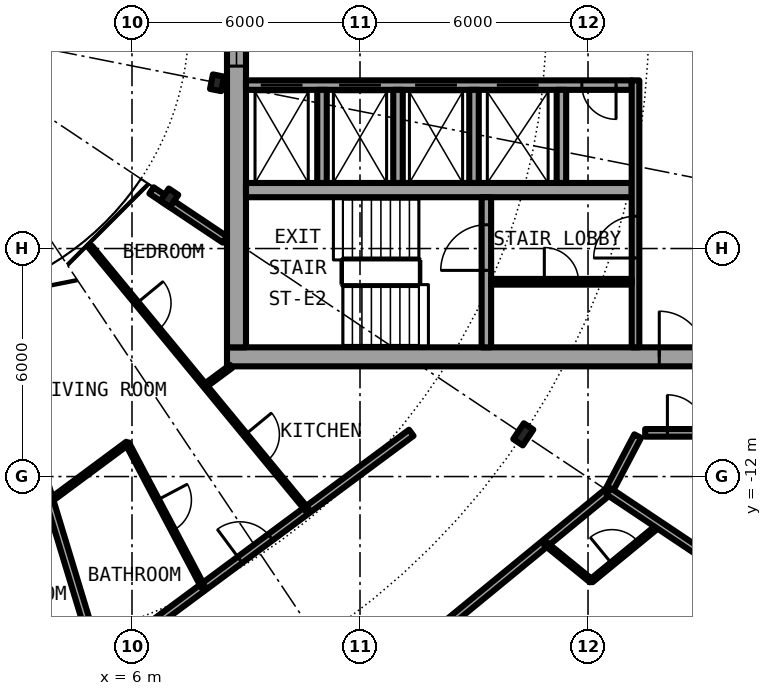
"""IFC4 building model, lengths in metres.
Left out: names, types, materials, properties, quantities, classifications, styles, units other than length and angle.
Written with IfcOpenShell. Run it as: python <this file> out.ifc"""

import sys

from ifc_helpers import new_model, si_unit, direction, frame, frame_2d, origin, origin_2d, place, context, subcontext, project, spatial, rectangle, i_section, extrude, element, fill, save


model = new_model("IFC4")
c1 = context("Model", 3, precision=1e-05, world=origin(), true_north=direction((0.0, 1.0)))
c2 = subcontext(c1, "Body", "Model", "MODEL_VIEW")
j1 = project(units=[si_unit("LENGTHUNIT", "METRE"), si_unit("PLANEANGLEUNIT", "RADIAN")], contexts=[c1])
p1 = place(None, origin())
s1 = spatial("IfcSite", under=j1, at=p1, CompositionType="ELEMENT")
p2 = place(p1, origin())
s2 = spatial("IfcBuilding", under=s1, at=p2, CompositionType="ELEMENT")
p3 = place(p2, frame((0.0, 0.0, 154.35)))
s3 = spatial("IfcBuildingStorey", under=s2, at=p3, CompositionType="ELEMENT", Elevation=154.35)
p4 = place(p3, frame((16.297, -10.889, 0.0), z_axis=(0.0, 0.0, 1.0), x_axis=(0.831469612303, -0.55557023302, 0.0)))
e1 = element("IfcColumn", 1, at=p4, inside=s3, PredefinedType="COLUMN", context=c2, shape_type="SweptSolid", body=[
    extrude(i_section(OverallWidth=0.3, OverallDepth=0.5, WebThickness=0.014, FlangeThickness=0.028, FilletRadius=0.027, at=origin_2d()), origin(), (0.0, 0.0, 1.0), 3.05),
])
for number, where, z_axis, x_axis in (
    (2, (6.984, -4.667, 0.0), (0.0, 0.0, 1.0), (0.831, -0.556, 0.0)),
    (3, (8.239, -1.639, 0.0), (0.0, 0.0, 1.0), (0.981, -0.195, 0.0)),
):
    element("IfcColumn", number, at=place(p3, frame(where, z_axis=z_axis, x_axis=x_axis)), inside=s3, PredefinedType="COLUMN", context=c2, shape_type="SweptSolid", body=[
        extrude(i_section(OverallWidth=0.3, OverallDepth=0.39, WebThickness=0.011, FlangeThickness=0.019, FilletRadius=0.027, at=origin_2d()), origin(), (0.0, 0.0, 1.0), 3.05),
    ])
p5 = place(p3, frame((19.304, -19.304, 0.0), z_axis=(0.0, 0.0, 1.0), x_axis=(0.634382322723, 0.773019449054, 0.0)))
e4 = element("IfcWall", 4, at=p5, inside=s3, PredefinedType="SOLIDWALL", context=c2, shape_type="SweptSolid", body=[
    extrude(rectangle(XDim=5.352, YDim=0.25, at=frame_2d((2.676, 0.0))), origin(), (0.0, 0.0, 1.0), 2.7),
])
p6 = place(p5, frame((0.841, 0.0, 0.0)))
e5 = element("IfcOpeningElement", 5, at=p6, cuts=e4, PredefinedType="OPENING", context=c2, shape_type="SweptSolid", body=[
    extrude(rectangle(XDim=1.0, YDim=2.2, at=frame_2d((0.5, 1.1))), frame((0.0, 0.135, 0.0), z_axis=(0.0, -1.0, 0.0), x_axis=(1.0, 0.0, 0.0)), (0.0, 0.0, 1.0), 0.27),
])
p7 = place(p5, frame((3.111, 0.0, 0.3)))
e6 = element("IfcOpeningElement", 6, at=p7, cuts=e4, PredefinedType="OPENING", context=c2, shape_type="SweptSolid", body=[
    extrude(rectangle(XDim=1.8, YDim=2.1, at=frame_2d((0.9, 1.05))), frame((0.0, 0.135, 0.0), z_axis=(0.0, -1.0, 0.0), x_axis=(1.0, 0.0, 0.0)), (0.0, 0.0, 1.0), 0.27),
])
p8 = place(p3, frame((8.5, -8.85, 0.0), z_axis=(0.0, 0.0, 1.0), x_axis=(1.0, 0.0, 0.0)))
e7 = element("IfcWall", 7, at=p8, inside=s3, PredefinedType="SHEAR", context=c2, shape_type="SweptSolid", body=[
    extrude(rectangle(XDim=13.6, YDim=0.5, at=frame_2d((6.8, 0.0))), origin(), (0.0, 0.0, 1.0), 3.05),
])
p9 = place(p8, frame((11.375, 0.0, 0.0)))
e8 = element("IfcOpeningElement", 8, at=p9, cuts=e7, PredefinedType="OPENING", context=c2, shape_type="SweptSolid", body=[
    extrude(rectangle(XDim=1.2, YDim=2.3, at=frame_2d((0.6, 1.15))), frame((0.0, 0.26, 0.0), z_axis=(0.0, -1.0, 0.0), x_axis=(1.0, 0.0, 0.0)), (0.0, 0.0, 1.0), 0.52),
])
p10 = place(p3, frame((8.75, -8.6, 0.0), z_axis=(0.0, 0.0, 1.0), x_axis=(0.0, 1.0, 0.0)))
e9 = element("IfcWall", 9, at=p10, inside=s3, PredefinedType="SHEAR", context=c2, shape_type="SweptSolid", body=[
    extrude(rectangle(XDim=17.2, YDim=0.5, at=frame_2d((8.6, 0.0))), origin(), (0.0, 0.0, 1.0), 3.05),
])
p11 = place(p10, frame((7.4, 0.0, 0.1)))
e10 = element("IfcOpeningElement", 10, at=p11, cuts=e9, PredefinedType="OPENING", context=c2, shape_type="SweptSolid", body=[
    extrude(rectangle(XDim=2.4, YDim=2.2, at=frame_2d((1.2, 1.1))), frame((0.0, 0.26, 0.0), z_axis=(0.0, -1.0, 0.0), x_axis=(1.0, 0.0, 0.0)), (0.0, 0.0, 1.0), 0.52),
])
p12 = place(p3, frame((19.15, -1.7, 0.0), z_axis=(0.0, 0.0, 1.0), x_axis=(-1.0, 0.0, 0.0)))
e11 = element("IfcWall", 11, at=p12, inside=s3, PredefinedType="SHEAR", context=c2, shape_type="SweptSolid", body=[
    extrude(rectangle(XDim=10.15, YDim=0.25, at=frame_2d((5.075, 0.0))), origin(), (0.0, 0.0, 1.0), 3.05),
])
p13 = place(p12, frame((8.663, 0.0, 0.0)))
e12 = element("IfcOpeningElement", 12, at=p13, cuts=e11, PredefinedType="OPENING", context=c2, shape_type="SweptSolid", body=[
    extrude(rectangle(XDim=1.1, YDim=2.3, at=frame_2d((0.55, 1.15))), frame((0.0, 0.135, 0.0), z_axis=(0.0, -1.0, 0.0), x_axis=(1.0, 0.0, 0.0)), (0.0, 0.0, 1.0), 0.27),
])
p14 = place(p12, frame((6.6, 0.0, 0.0)))
e13 = element("IfcOpeningElement", 13, at=p14, cuts=e11, PredefinedType="OPENING", context=c2, shape_type="SweptSolid", body=[
    extrude(rectangle(XDim=1.1, YDim=2.3, at=frame_2d((0.55, 1.15))), frame((0.0, 0.135, 0.0), z_axis=(0.0, -1.0, 0.0), x_axis=(1.0, 0.0, 0.0)), (0.0, 0.0, 1.0), 0.27),
])
p15 = place(p12, frame((4.6, 0.0, 0.0)))
e14 = element("IfcOpeningElement", 14, at=p15, cuts=e11, PredefinedType="OPENING", context=c2, shape_type="SweptSolid", body=[
    extrude(rectangle(XDim=1.1, YDim=2.3, at=frame_2d((0.55, 1.15))), frame((0.0, 0.135, 0.0), z_axis=(0.0, -1.0, 0.0), x_axis=(1.0, 0.0, 0.0)), (0.0, 0.0, 1.0), 0.27),
])
p16 = place(p12, frame((2.45, 0.0, 0.0)))
e15 = element("IfcOpeningElement", 15, at=p16, cuts=e11, PredefinedType="OPENING", context=c2, shape_type="SweptSolid", body=[
    extrude(rectangle(XDim=1.1, YDim=2.3, at=frame_2d((0.55, 1.15))), frame((0.0, 0.135, 0.0), z_axis=(0.0, -1.0, 0.0), x_axis=(1.0, 0.0, 0.0)), (0.0, 0.0, 1.0), 0.27),
])
p17 = place(p12, frame((0.413, 0.0, 0.0)))
e16 = element("IfcOpeningElement", 16, at=p17, cuts=e11, PredefinedType="OPENING", context=c2, shape_type="SweptSolid", body=[
    extrude(rectangle(XDim=0.9, YDim=2.3, at=frame_2d((0.45, 1.15))), frame((0.0, 0.135, 0.0), z_axis=(0.0, -1.0, 0.0), x_axis=(1.0, 0.0, 0.0)), (0.0, 0.0, 1.0), 0.27),
])
p18 = place(p3, frame((9.0, -4.462, 0.0), z_axis=(0.0, 0.0, 1.0), x_axis=(1.0, 0.0, 0.0)))
e17 = element("IfcWall", 17, at=p18, inside=s3, PredefinedType="SHEAR", context=c2, shape_type="SweptSolid", body=[
    extrude(rectangle(XDim=10.15, YDim=0.375, at=frame_2d((5.075, 0.0))), origin(), (0.0, 0.0, 1.0), 3.05),
])
p19 = place(p3, frame((15.325, -8.6, 0.0), z_axis=(0.0, 0.0, 1.0), x_axis=(0.0, 1.0, 0.0)))
e18 = element("IfcWall", 18, at=p19, inside=s3, PredefinedType="SHEAR", context=c2, shape_type="SweptSolid", body=[
    extrude(rectangle(XDim=3.95, YDim=0.25, at=frame_2d((1.975, 0.0))), origin(), (0.0, 0.0, 1.0), 3.05),
])
p20 = place(p19, frame((2.025, 0.0, 0.0)))
e19 = element("IfcOpeningElement", 19, at=p20, cuts=e18, PredefinedType="OPENING", context=c2, shape_type="SweptSolid", body=[
    extrude(rectangle(XDim=1.2, YDim=2.3, at=frame_2d((0.6, 1.15))), frame((0.0, 0.135, 0.0), z_axis=(0.0, -1.0, 0.0), x_axis=(1.0, 0.0, 0.0)), (0.0, 0.0, 1.0), 0.27),
])
for number, where, z_axis, x_axis in (
    (20, (15.0, -1.825, 0.0), (0.0, 0.0, 1.0), (0.0, -1.0, 0.0)),
    (21, (17.3, -1.825, 0.0), (0.0, 0.0, 1.0), (0.0, -1.0, 0.0)),
):
    element("IfcWall", number, at=place(p3, frame(where, z_axis=z_axis, x_axis=x_axis)), inside=s3, PredefinedType="SOLIDWALL", context=c2, shape_type="SweptSolid", body=[
        extrude(rectangle(XDim=2.45, YDim=0.25, at=frame_2d((1.225, 0.0))), origin(), (0.0, 0.0, 1.0), 2.7),
    ])
p21 = place(p3, frame((19.25, -8.6, 0.0), z_axis=(0.0, 0.0, 1.0), x_axis=(0.0, 1.0, 0.0)))
e22 = element("IfcWall", 22, at=p21, inside=s3, PredefinedType="SOLIDWALL", context=c2, shape_type="SweptSolid", body=[
    extrude(rectangle(XDim=7.025, YDim=0.2, at=frame_2d((3.513, 0.0))), origin(), (0.0, 0.0, 1.0), 2.7),
])
p22 = place(p21, frame((2.35, 0.0, 0.0)))
e23 = element("IfcOpeningElement", 23, at=p22, cuts=e22, PredefinedType="OPENING", context=c2, shape_type="SweptSolid", body=[
    extrude(rectangle(XDim=1.1, YDim=2.3, at=frame_2d((0.55, 1.15))), frame((0.0, 0.11, 0.0), z_axis=(0.0, -1.0, 0.0), x_axis=(1.0, 0.0, 0.0)), (0.0, 0.0, 1.0), 0.22),
])
for number, where, z_axis, x_axis in (
    (24, (11.0, -1.825, 0.0), (0.0, 0.0, 1.0), (0.0, -1.0, 0.0)),
    (25, (13.0, -1.825, 0.0), (0.0, 0.0, 1.0), (0.0, -1.0, 0.0)),
):
    element("IfcWall", number, at=place(p3, frame(where, z_axis=z_axis, x_axis=x_axis)), inside=s3, PredefinedType="SOLIDWALL", context=c2, shape_type="SweptSolid", body=[
        extrude(rectangle(XDim=2.45, YDim=0.25, at=frame_2d((1.225, 0.0))), origin(), (0.0, 0.0, 1.0), 2.7),
    ])
p23 = place(p3, frame((15.45, -6.875, 0.0), z_axis=(0.0, 0.0, 1.0), x_axis=(1.0, 0.0, 0.0)))
e26 = element("IfcWall", 26, at=p23, inside=s3, PredefinedType="PARTITIONING", context=c2, shape_type="SweptSolid", body=[
    extrude(rectangle(XDim=3.7, YDim=0.15, at=frame_2d((1.85, 0.0))), origin(), (0.0, 0.0, 1.0), 2.7),
])
p24 = place(p23, frame((1.4, 0.0, 0.0)))
e27 = element("IfcOpeningElement", 27, at=p24, cuts=e26, PredefinedType="OPENING", context=c2, shape_type="SweptSolid", body=[
    extrude(rectangle(XDim=0.9, YDim=2.3, at=frame_2d((0.45, 1.15))), frame((0.0, 0.085, 0.0), z_axis=(0.0, -1.0, 0.0), x_axis=(1.0, 0.0, 0.0)), (0.0, 0.0, 1.0), 0.17),
])
p25 = place(p3, frame((18.087, -14.742, 0.0), z_axis=(0.0, 0.0, 1.0), x_axis=(0.77288890179, 0.634541366256, 0.0)))
e28 = element("IfcWall", 28, at=p25, inside=s3, PredefinedType="PARTITIONING", context=c2, shape_type="SweptSolid", body=[
    extrude(rectangle(XDim=2.313, YDim=0.1, at=frame_2d((1.157, 0.0))), origin(), (0.0, 0.0, 1.0), 2.7),
])
p26 = place(p25, frame((0.702, 0.0, 0.0)))
e29 = element("IfcOpeningElement", 29, at=p26, cuts=e28, PredefinedType="OPENING", context=c2, shape_type="SweptSolid", body=[
    extrude(rectangle(XDim=0.9, YDim=2.3, at=frame_2d((0.45, 1.15))), frame((0.0, 0.06, 0.0), z_axis=(0.0, -1.0, 0.0), x_axis=(1.0, 0.0, 0.0)), (0.0, 0.0, 1.0), 0.12),
])
p27 = place(p3, frame((18.542, -12.389, 0.0), z_axis=(0.0, 0.0, 1.0), x_axis=(0.465605550524, 0.884992356646, 0.0)))
e30 = element("IfcWall", 30, at=p27, inside=s3, PredefinedType="PARTITIONING", context=c2, shape_type="SweptSolid", body=[
    extrude(rectangle(XDim=1.643, YDim=0.2, at=frame_2d((0.821, 0.0))), origin(), (0.0, 0.0, 1.0), 2.7),
])
p28 = place(p3, frame((8.534, -20.603, 0.0), z_axis=(0.0, 0.0, 1.0), x_axis=(0.772983503654, 0.634426121056, 0.0)))
e31 = element("IfcWall", 31, at=p28, inside=s3, PredefinedType="PARTITIONING", context=c2, shape_type="SweptSolid", body=[
    extrude(rectangle(XDim=12.947, YDim=0.2, at=frame_2d((6.474, 0.0))), origin(), (0.0, 0.0, 1.0), 2.7),
])
p29 = place(p28, frame((4.895, 0.0, 0.0)))
e32 = element("IfcOpeningElement", 32, at=p29, cuts=e31, PredefinedType="OPENING", context=c2, shape_type="SweptSolid", body=[
    extrude(rectangle(XDim=1.0, YDim=2.3, at=frame_2d((0.5, 1.15))), frame((0.0, 0.11, 0.0), z_axis=(0.0, -1.0, 0.0), x_axis=(1.0, 0.0, 0.0)), (0.0, 0.0, 1.0), 0.22),
])
p30 = place(p3, frame((5.137, -16.938, 0.0), z_axis=(0.0, 0.0, 1.0), x_axis=(0.803229232922, 0.595670042371, 0.0)))
e33 = element("IfcWall", 33, at=p30, inside=s3, PredefinedType="PARTITIONING", context=c2, shape_type="SweptSolid", body=[
    extrude(rectangle(XDim=10.224, YDim=0.2, at=frame_2d((5.112, 0.0))), origin(), (0.0, 0.0, 1.0), 2.7),
])
p31 = place(p30, frame((4.612, 0.0, 0.0)))
e34 = element("IfcOpeningElement", 34, at=p31, cuts=e33, PredefinedType="OPENING", context=c2, shape_type="SweptSolid", body=[
    extrude(rectangle(XDim=1.0, YDim=2.3, at=frame_2d((0.5, 1.15))), frame((0.0, 0.11, 0.0), z_axis=(0.0, -1.0, 0.0), x_axis=(1.0, 0.0, 0.0)), (0.0, 0.0, 1.0), 0.22),
])
p32 = place(p3, frame((3.835, -12.64, 0.0), z_axis=(0.0, 0.0, 1.0), x_axis=(0.803259509791, 0.595629213463, 0.0)))
e35 = element("IfcWall", 35, at=p32, inside=s3, PredefinedType="PARTITIONING", context=c2, shape_type="SweptSolid", body=[
    extrude(rectangle(XDim=2.543, YDim=0.1, at=frame_2d((1.272, 0.0))), origin(), (0.0, 0.0, 1.0), 2.7),
])
p33 = place(p3, frame((7.919, -9.611, 0.0), z_axis=(0.0, 0.0, 1.0), x_axis=(0.803199066515, 0.595710718007, 0.0)))
e36 = element("IfcWall", 36, at=p33, inside=s3, PredefinedType="PARTITIONING", context=c2, shape_type="SweptSolid", body=[
    extrude(rectangle(XDim=0.858, YDim=0.1, at=frame_2d((0.429, 0.0))), origin(), (0.0, 0.0, 1.0), 2.7),
])
p34 = place(p3, frame((19.504, -10.85, 0.0), z_axis=(0.0, 0.0, 1.0), x_axis=(1.0, 0.0, 0.0)))
e37 = element("IfcWall", 37, at=p34, inside=s3, PredefinedType="PARTITIONING", context=c2, shape_type="SweptSolid", body=[
    extrude(rectangle(XDim=2.171, YDim=0.2, at=frame_2d((1.085, 0.0))), origin(), (0.0, 0.0, 1.0), 2.7),
])
p35 = place(p34, frame((0.585, 0.0, 0.0)))
e38 = element("IfcOpeningElement", 38, at=p35, cuts=e37, PredefinedType="OPENING", context=c2, shape_type="SweptSolid", body=[
    extrude(rectangle(XDim=1.0, YDim=2.3, at=frame_2d((0.5, 1.15))), frame((0.0, 0.11, 0.0), z_axis=(0.0, -1.0, 0.0), x_axis=(1.0, 0.0, 0.0)), (0.0, 0.0, 1.0), 0.22),
])
p36 = place(p3, frame((6.513, -4.472, 0.0), z_axis=(0.0, 0.0, 1.0), x_axis=(0.83133816625, -0.555766905579, 0.0)))
e39 = element("IfcWall", 39, at=p36, inside=s3, PredefinedType="PARTITIONING", context=c2, shape_type="SweptSolid", body=[
    extrude(rectangle(XDim=2.323, YDim=0.2, at=frame_2d((1.162, 0.0))), origin(), (0.0, 0.0, 1.0), 2.7),
])
p37 = place(p3, frame((2.241, -7.388, 0.0), z_axis=(0.0, 0.0, 1.0), x_axis=(0.290284403441, -0.956940418793, 0.0)))
e40 = element("IfcWall", 40, at=p37, inside=s3, PredefinedType="PARTITIONING", context=c2, shape_type="SweptSolid", body=[
    extrude(rectangle(XDim=9.98, YDim=0.2, at=frame_2d((4.99, 0.0))), origin(), (0.0, 0.0, 1.0), 2.7),
])
p38 = place(p3, frame((4.908, -5.959, 0.0), z_axis=(0.0, 0.0, 1.0), x_axis=(0.636115614725, -0.771593756262, 0.0)))
e41 = element("IfcWall", 41, at=p38, inside=s3, PredefinedType="PARTITIONING", context=c2, shape_type="SweptSolid", body=[
    extrude(rectangle(XDim=8.967, YDim=0.1, at=frame_2d((4.483, 0.0))), origin(), (0.0, 0.0, 1.0), 2.7),
])
p39 = place(p38, frame((6.4, 0.0, 0.0)))
e42 = element("IfcOpeningElement", 42, at=p39, cuts=e41, PredefinedType="OPENING", context=c2, shape_type="SweptSolid", body=[
    extrude(rectangle(XDim=0.9, YDim=2.3, at=frame_2d((0.45, 1.15))), frame((0.0, 0.06, 0.0), z_axis=(0.0, -1.0, 0.0), x_axis=(1.0, 0.0, 0.0)), (0.0, 0.0, 1.0), 0.12),
])
p40 = place(p38, frame((1.917, 0.0, 0.0)))
e43 = element("IfcOpeningElement", 43, at=p40, cuts=e41, PredefinedType="OPENING", context=c2, shape_type="SweptSolid", body=[
    extrude(rectangle(XDim=0.9, YDim=2.3, at=frame_2d((0.45, 1.15))), frame((0.0, 0.06, 0.0), z_axis=(0.0, -1.0, 0.0), x_axis=(1.0, 0.0, 0.0)), (0.0, 0.0, 1.0), 0.12),
])
p41 = place(p3, frame((5.875, -11.126, 0.0), z_axis=(0.0, 0.0, 1.0), x_axis=(0.467030118529, -0.884241408432, 0.0)))
e44 = element("IfcWall", 44, at=p41, inside=s3, PredefinedType="PARTITIONING", context=c2, shape_type="SweptSolid", body=[
    extrude(rectangle(XDim=4.278, YDim=0.1, at=frame_2d((2.139, 0.0))), origin(), (0.0, 0.0, 1.0), 2.7),
])
p42 = place(p41, frame((1.689, 0.0, 0.0)))
e45 = element("IfcOpeningElement", 45, at=p42, cuts=e44, PredefinedType="OPENING", context=c2, shape_type="SweptSolid", body=[
    extrude(rectangle(XDim=0.9, YDim=2.3, at=frame_2d((0.45, 1.15))), frame((0.0, 0.06, 0.0), z_axis=(0.0, -1.0, 0.0), x_axis=(1.0, 0.0, 0.0)), (0.0, 0.0, 1.0), 0.12),
])
p43 = place(p3, frame((16.874, -13.758, 0.0), z_axis=(0.0, 0.0, 1.0), x_axis=(0.774869051393, -0.632121786679, 0.0)))
e46 = element("IfcWall", 46, at=p43, inside=s3, PredefinedType="PARTITIONING", context=c2, shape_type="SweptSolid", body=[
    extrude(rectangle(XDim=1.562, YDim=0.1, at=frame_2d((0.781, 0.0))), origin(), (0.0, 0.0, 1.0), 2.7),
])
p44 = place(p3, frame((18.542, -12.389, 0.0), z_axis=(0.0, 0.0, 1.0), x_axis=(0.831387096605, -0.55569370664, 0.0)))
e47 = element("IfcWall", 47, at=p44, inside=s3, PredefinedType="PARTITIONING", context=c2, shape_type="SweptSolid", body=[
    extrude(rectangle(XDim=4.875, YDim=0.2, at=frame_2d((2.438, 0.0))), origin(), (0.0, 0.0, 1.0), 2.7),
])
p45 = place(p13, origin())
e48 = element("IfcDoor", 48, at=p45, inside=s3, OperationType="DOUBLE_DOOR_SLIDING", PredefinedType="DOOR", context=c2, shape_type="SweptSolid", body=[
    extrude(rectangle(XDim=1.1, YDim=2.3, at=frame_2d((0.55, 1.15))), frame((0.0, 0.025, 0.0), z_axis=(0.0, -1.0, 0.0), x_axis=(1.0, 0.0, 0.0)), (0.0, 0.0, 1.0), 0.05),
])
fill(e12, e48)
p46 = place(p14, origin())
e49 = element("IfcDoor", 49, at=p46, inside=s3, OperationType="DOUBLE_DOOR_SLIDING", PredefinedType="DOOR", context=c2, shape_type="SweptSolid", body=[
    extrude(rectangle(XDim=1.1, YDim=2.3, at=frame_2d((0.55, 1.15))), frame((0.0, 0.025, 0.0), z_axis=(0.0, -1.0, 0.0), x_axis=(1.0, 0.0, 0.0)), (0.0, 0.0, 1.0), 0.05),
])
fill(e13, e49)
p47 = place(p15, origin())
e50 = element("IfcDoor", 50, at=p47, inside=s3, OperationType="DOUBLE_DOOR_SLIDING", PredefinedType="DOOR", context=c2, shape_type="SweptSolid", body=[
    extrude(rectangle(XDim=1.1, YDim=2.3, at=frame_2d((0.55, 1.15))), frame((0.0, 0.025, 0.0), z_axis=(0.0, -1.0, 0.0), x_axis=(1.0, 0.0, 0.0)), (0.0, 0.0, 1.0), 0.05),
])
fill(e14, e50)
p48 = place(p16, origin())
e51 = element("IfcDoor", 51, at=p48, inside=s3, OperationType="DOUBLE_DOOR_SLIDING", PredefinedType="DOOR", context=c2, shape_type="SweptSolid", body=[
    extrude(rectangle(XDim=1.1, YDim=2.3, at=frame_2d((0.55, 1.15))), frame((0.0, 0.025, 0.0), z_axis=(0.0, -1.0, 0.0), x_axis=(1.0, 0.0, 0.0)), (0.0, 0.0, 1.0), 0.05),
])
fill(e15, e51)
p49 = place(p17, origin())
e52 = element("IfcDoor", 52, at=p49, inside=s3, OperationType="SINGLE_SWING_RIGHT", PredefinedType="DOOR", context=c2, shape_type="SweptSolid", body=[
    extrude(rectangle(XDim=0.9, YDim=2.3, at=frame_2d((0.45, 1.15))), frame((0.0, 0.025, 0.0), z_axis=(0.0, -1.0, 0.0), x_axis=(1.0, 0.0, 0.0)), (0.0, 0.0, 1.0), 0.05),
])
fill(e16, e52)
p50 = place(p24, origin())
e53 = element("IfcDoor", 53, at=p50, inside=s3, OperationType="SINGLE_SWING_LEFT", PredefinedType="DOOR", context=c2, shape_type="SweptSolid", body=[
    extrude(rectangle(XDim=0.9, YDim=2.3, at=frame_2d((0.45, 1.15))), frame((0.0, 0.025, 0.0), z_axis=(0.0, -1.0, 0.0), x_axis=(1.0, 0.0, 0.0)), (0.0, 0.0, 1.0), 0.05),
])
fill(e27, e53)
p51 = place(p20, origin())
e54 = element("IfcDoor", 54, at=p51, inside=s3, OperationType="SINGLE_SWING_LEFT", PredefinedType="DOOR", context=c2, shape_type="SweptSolid", body=[
    extrude(rectangle(XDim=1.2, YDim=2.3, at=frame_2d((0.6, 1.15))), frame((0.0, 0.025, 0.0), z_axis=(0.0, -1.0, 0.0), x_axis=(1.0, 0.0, 0.0)), (0.0, 0.0, 1.0), 0.05),
])
fill(e19, e54)
p52 = place(p22, origin())
e55 = element("IfcDoor", 55, at=p52, inside=s3, OperationType="SINGLE_SWING_RIGHT", PredefinedType="DOOR", context=c2, shape_type="SweptSolid", body=[
    extrude(rectangle(XDim=1.1, YDim=2.3, at=frame_2d((0.55, 1.15))), frame((0.0, 0.025, 0.0), z_axis=(0.0, -1.0, 0.0), x_axis=(1.0, 0.0, 0.0)), (0.0, 0.0, 1.0), 0.05),
])
fill(e23, e55)
p53 = place(p9, origin())
e56 = element("IfcDoor", 56, at=p53, inside=s3, OperationType="SINGLE_SWING_LEFT", PredefinedType="DOOR", context=c2, shape_type="SweptSolid", body=[
    extrude(rectangle(XDim=1.2, YDim=2.3, at=frame_2d((0.6, 1.15))), frame((0.0, 0.025, 0.0), z_axis=(0.0, -1.0, 0.0), x_axis=(1.0, 0.0, 0.0)), (0.0, 0.0, 1.0), 0.05),
])
fill(e8, e56)
p54 = place(p11, origin())
e57 = element("IfcWindow", 57, at=p54, inside=s3, PartitioningType="SINGLE_PANEL", PredefinedType="WINDOW", context=c2, shape_type="SweptSolid", body=[
    extrude(rectangle(XDim=2.4, YDim=2.2, at=frame_2d((1.2, 1.1))), frame((0.0, 0.03, 0.0), z_axis=(0.0, -1.0, 0.0), x_axis=(1.0, 0.0, 0.0)), (0.0, 0.0, 1.0), 0.06),
])
fill(e10, e57)
p55 = place(p26, origin())
e58 = element("IfcDoor", 58, at=p55, inside=s3, OperationType="SINGLE_SWING_LEFT", PredefinedType="DOOR", context=c2, shape_type="SweptSolid", body=[
    extrude(rectangle(XDim=0.9, YDim=2.3, at=frame_2d((0.45, 1.15))), frame((0.0, 0.025, 0.0), z_axis=(0.0, -1.0, 0.0), x_axis=(1.0, 0.0, 0.0)), (0.0, 0.0, 1.0), 0.05),
])
fill(e29, e58)
p56 = place(p31, origin())
e59 = element("IfcDoor", 59, at=p56, inside=s3, OperationType="SINGLE_SWING_RIGHT", PredefinedType="DOOR", context=c2, shape_type="SweptSolid", body=[
    extrude(rectangle(XDim=1.0, YDim=2.3, at=frame_2d((0.5, 1.15))), frame((0.0, 0.025, 0.0), z_axis=(0.0, -1.0, 0.0), x_axis=(1.0, 0.0, 0.0)), (0.0, 0.0, 1.0), 0.05),
])
fill(e34, e59)
p57 = place(p42, origin())
e60 = element("IfcDoor", 60, at=p57, inside=s3, OperationType="SINGLE_SWING_RIGHT", PredefinedType="DOOR", context=c2, shape_type="SweptSolid", body=[
    extrude(rectangle(XDim=0.9, YDim=2.3, at=frame_2d((0.45, 1.15))), frame((0.0, 0.025, 0.0), z_axis=(0.0, -1.0, 0.0), x_axis=(1.0, 0.0, 0.0)), (0.0, 0.0, 1.0), 0.05),
])
fill(e45, e60)
p58 = place(p39, origin())
e61 = element("IfcDoor", 61, at=p58, inside=s3, OperationType="SINGLE_SWING_RIGHT", PredefinedType="DOOR", context=c2, shape_type="SweptSolid", body=[
    extrude(rectangle(XDim=0.9, YDim=2.3, at=frame_2d((0.45, 1.15))), frame((0.0, 0.025, 0.0), z_axis=(0.0, -1.0, 0.0), x_axis=(1.0, 0.0, 0.0)), (0.0, 0.0, 1.0), 0.05),
])
fill(e42, e61)
p59 = place(p40, origin())
e62 = element("IfcDoor", 62, at=p59, inside=s3, OperationType="SINGLE_SWING_LEFT", PredefinedType="DOOR", context=c2, shape_type="SweptSolid", body=[
    extrude(rectangle(XDim=0.9, YDim=2.3, at=frame_2d((0.45, 1.15))), frame((0.0, 0.025, 0.0), z_axis=(0.0, -1.0, 0.0), x_axis=(1.0, 0.0, 0.0)), (0.0, 0.0, 1.0), 0.05),
])
fill(e43, e62)
p60 = place(p35, origin())
e63 = element("IfcDoor", 63, at=p60, inside=s3, OperationType="SINGLE_SWING_LEFT", PredefinedType="DOOR", context=c2, shape_type="SweptSolid", body=[
    extrude(rectangle(XDim=1.0, YDim=2.3, at=frame_2d((0.5, 1.15))), frame((0.0, 0.025, 0.0), z_axis=(0.0, -1.0, 0.0), x_axis=(1.0, 0.0, 0.0)), (0.0, 0.0, 1.0), 0.05),
])
fill(e38, e63)
save(model, sys.argv[1])
